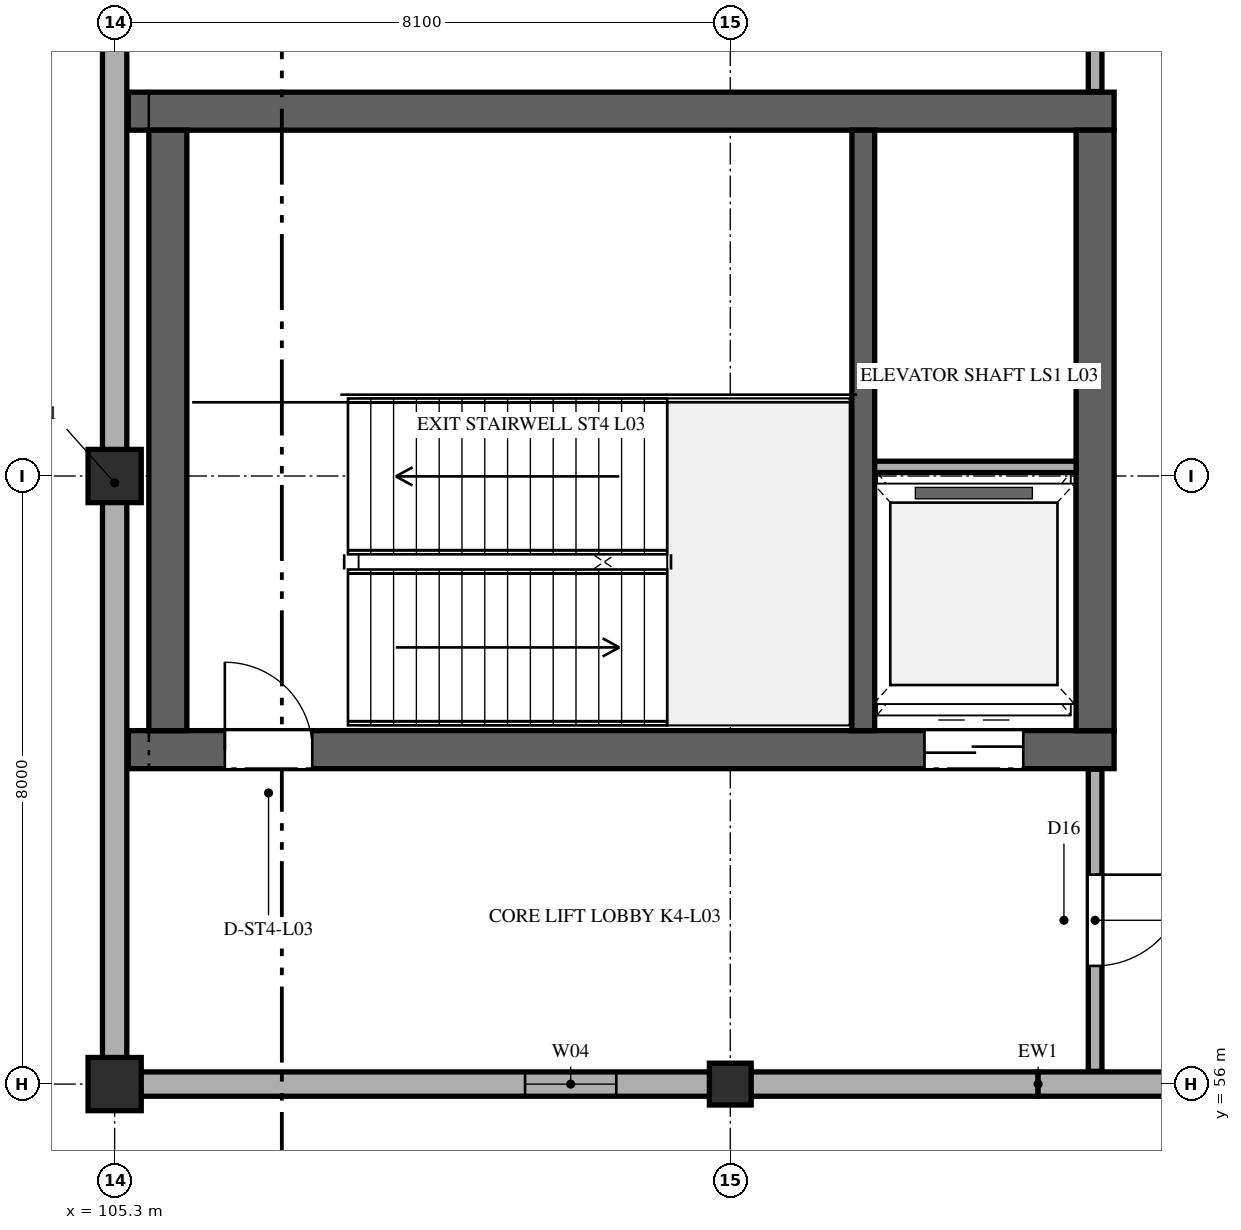
"""IFC4 building model, lengths in metres.
Left out: names, types, materials, properties, quantities, classifications, styles, units other than length and angle.
Written with IfcOpenShell. Run it as: python <this file> out.ifc"""

import sys

from ifc_helpers import new_model, si_unit, direction, frame, frame_2d, origin, origin_2d, place, context, subcontext, project, spatial, rectangle, extrude, element, fill, save


model = new_model("IFC4")
c1 = context("Model", 3, precision=1e-05, world=origin(), true_north=direction((0.0, 1.0)))
c2 = subcontext(c1, "Body", "Model", "MODEL_VIEW")
j1 = project(units=[si_unit("LENGTHUNIT", "METRE"), si_unit("PLANEANGLEUNIT", "RADIAN")], contexts=[c1])
p1 = place(None, origin())
s1 = spatial("IfcSite", under=j1, at=p1, CompositionType="ELEMENT")
p2 = place(p1, origin())
s2 = spatial("IfcBuilding", under=s1, at=p2, CompositionType="ELEMENT")
p3 = place(p2, frame((0.0, 0.0, 14.7)))
s3 = spatial("IfcBuildingStorey", under=s2, at=p3, CompositionType="ELEMENT", Elevation=14.7)
p4 = place(p3, frame((105.48, 60.4, 0.0), z_axis=(0.0, 0.0, 1.0), x_axis=(1.0, 0.0, 0.0)))
e1 = element("IfcWall", 1, at=p4, inside=s3, PredefinedType="SHEAR", context=c2, shape_type="SweptSolid", body=[
    extrude(rectangle(XDim=12.97, YDim=0.5, at=frame_2d((6.485, 0.0))), origin(), (0.0, 0.0, 1.0), 5.1),
])
p5 = place(p4, frame((1.27, 0.0, 0.0)))
e2 = element("IfcOpeningElement", 2, at=p5, cuts=e1, PredefinedType="OPENING", context=c2, shape_type="SweptSolid", body=[
    extrude(rectangle(XDim=1.15, YDim=2.25, at=frame_2d((0.575, 1.125))), frame((0.0, 0.26, 0.0), z_axis=(0.0, -1.0, 0.0), x_axis=(1.0, 0.0, 0.0)), (0.0, 0.0, 1.0), 0.52),
])
p6 = place(p4, frame((10.475, 0.0, 0.0)))
e3 = element("IfcOpeningElement", 3, at=p6, cuts=e1, PredefinedType="OPENING", context=c2, shape_type="SweptSolid", body=[
    extrude(rectangle(XDim=1.3, YDim=2.3, at=frame_2d((0.65, 1.15))), frame((0.0, 0.26, 0.0), z_axis=(0.0, -1.0, 0.0), x_axis=(1.0, 0.0, 0.0)), (0.0, 0.0, 1.0), 0.52),
])
p7 = place(p3, frame((105.48, 68.8, 0.0), z_axis=(0.0, 0.0, 1.0), x_axis=(1.0, 0.0, 0.0)))
e4 = element("IfcWall", 4, at=p7, inside=s3, PredefinedType="SHEAR", context=c2, shape_type="SweptSolid", body=[
    extrude(rectangle(XDim=12.97, YDim=0.5, at=frame_2d((6.485, 0.0))), origin(), (0.0, 0.0, 1.0), 5.1),
])
for number, where, z_axis, x_axis in (
    (5, (106.0, 60.65, 0.0), (0.0, 0.0, 1.0), (0.0, 1.0, 0.0)),
    (6, (118.2, 60.65, 0.0), (0.0, 0.0, 1.0), (0.0, 1.0, 0.0)),
):
    element("IfcWall", number, at=place(p3, frame(where, z_axis=z_axis, x_axis=x_axis)), inside=s3, PredefinedType="SHEAR", context=c2, shape_type="SweptSolid", body=[
        extrude(rectangle(XDim=7.9, YDim=0.5, at=frame_2d((3.95, 0.0))), origin(), (0.0, 0.0, 1.0), 5.1),
    ])
p8 = place(p3, frame((115.15, 60.65, 0.0), z_axis=(0.0, 0.0, 1.0), x_axis=(0.0, 1.0, 0.0)))
e7 = element("IfcWall", 7, at=p8, inside=s3, PredefinedType="SHEAR", context=c2, shape_type="SweptSolid", body=[
    extrude(rectangle(XDim=7.9, YDim=0.3, at=frame_2d((3.95, 0.0))), origin(), (0.0, 0.0, 1.0), 5.1),
])
for number, where, z_axis, x_axis in (
    (8, (105.3, 56.0, 0.0), (0.0, 0.0, 1.0), (1.0, 0.0, 0.0)),
    (9, (105.3, 64.0, 0.0), (0.0, 0.0, 1.0), (1.0, 0.0, 0.0)),
):
    element("IfcColumn", number, at=place(p3, frame(where, z_axis=z_axis, x_axis=x_axis)), inside=s3, PredefinedType="COLUMN", context=c2, shape_type="SweptSolid", body=[
        extrude(rectangle(XDim=0.7, YDim=0.7, at=origin_2d()), origin(), (0.0, 0.0, 1.0), 5.1),
    ])
p9 = place(p3, frame((113.4, 56.0, 0.0), z_axis=(0.0, 0.0, 1.0), x_axis=(1.0, 0.0, 0.0)))
e10 = element("IfcColumn", 10, at=p9, inside=s3, PredefinedType="COLUMN", context=c2, shape_type="SweptSolid", body=[
    extrude(rectangle(XDim=0.55, YDim=0.55, at=origin_2d()), origin(), (0.0, 0.0, 1.0), 5.1),
])
p10 = place(p3, frame((105.3, 71.82, 0.0), z_axis=(0.0, 0.0, 1.0), x_axis=(0.0, -1.0, 0.0)))
e11 = element("IfcWall", 11, at=p10, inside=s3, PredefinedType="SOLIDWALL", context=c2, shape_type="SweptSolid", body=[
    extrude(rectangle(XDim=15.82, YDim=0.32, at=frame_2d((7.91, 0.0))), origin(), (0.0, 0.0, 1.0), 4.332),
])
p11 = place(p3, frame((105.3, 56.0, 0.0), z_axis=(0.0, 0.0, 1.0), x_axis=(1.0, 0.0, 0.0)))
e12 = element("IfcWall", 12, at=p11, inside=s3, PredefinedType="SOLIDWALL", context=c2, shape_type="SweptSolid", body=[
    extrude(rectangle(XDim=12.15, YDim=0.32, at=frame_2d((6.075, 0.0))), origin(), (0.0, 0.0, 1.0), 4.144),
])
p12 = place(p11, frame((5.4, 0.0, 0.95)))
e13 = element("IfcOpeningElement", 13, at=p12, cuts=e12, PredefinedType="OPENING", context=c2, shape_type="SweptSolid", body=[
    extrude(rectangle(XDim=1.2, YDim=1.8, at=frame_2d((0.6, 0.9))), frame((0.0, 0.17, 0.0), z_axis=(0.0, -1.0, 0.0), x_axis=(1.0, 0.0, 0.0)), (0.0, 0.0, 1.0), 0.34),
])
p13 = place(p3, frame((117.45, 56.0, 0.0), z_axis=(0.0, 0.0, 1.0), x_axis=(1.0, 0.0, 0.0)))
e14 = element("IfcWall", 14, at=p13, inside=s3, PredefinedType="SOLIDWALL", context=c2, shape_type="SweptSolid", body=[
    extrude(rectangle(XDim=12.15, YDim=0.32, at=frame_2d((6.075, 0.0))), origin(), (0.0, 0.0, 1.0), 4.144),
])
p14 = place(p13, frame((3.6, 0.0, 0.95)))
e15 = element("IfcOpeningElement", 15, at=p14, cuts=e14, PredefinedType="OPENING", context=c2, shape_type="SweptSolid", body=[
    extrude(rectangle(XDim=1.35, YDim=1.8, at=frame_2d((0.675, 0.9))), frame((0.0, 0.17, 0.0), z_axis=(0.0, -1.0, 0.0), x_axis=(1.0, 0.0, 0.0)), (0.0, 0.0, 1.0), 0.34),
])
p15 = place(p3, frame((115.3, 64.12, 0.0), z_axis=(0.0, 0.0, 1.0), x_axis=(1.0, 0.0, 0.0)))
e16 = element("IfcWall", 16, at=p15, inside=s3, PredefinedType="PARTITIONING", context=c2, shape_type="SweptSolid", body=[
    extrude(rectangle(XDim=2.65, YDim=0.15, at=frame_2d((1.325, 0.0))), origin(), (0.0, 0.0, 1.0), 4.84),
])
p16 = place(p3, frame((118.2, 56.168, 0.0), z_axis=(0.0, 0.0, 1.0), x_axis=(0.0, 1.0, 0.0)))
e17 = element("IfcWall", 17, at=p16, inside=s3, PredefinedType="PARTITIONING", context=c2, shape_type="SweptSolid", body=[
    extrude(rectangle(XDim=3.974, YDim=0.18, at=frame_2d((1.987, 0.0))), origin(), (0.0, 0.0, 1.0), 4.84),
])
p17 = place(p16, frame((1.387, 0.0, 0.0)))
e18 = element("IfcOpeningElement", 18, at=p17, cuts=e17, PredefinedType="OPENING", context=c2, shape_type="SweptSolid", body=[
    extrude(rectangle(XDim=1.2, YDim=2.2, at=frame_2d((0.6, 1.1))), frame((0.0, 0.1, 0.0), z_axis=(0.0, -1.0, 0.0), x_axis=(1.0, 0.0, 0.0)), (0.0, 0.0, 1.0), 0.2),
])
p18 = place(p3, frame((118.2, 69.058, 0.0), z_axis=(0.0, 0.0, 1.0), x_axis=(0.0, 1.0, 0.0)))
e19 = element("IfcWall", 19, at=p18, inside=s3, PredefinedType="PARTITIONING", context=c2, shape_type="SweptSolid", body=[
    extrude(rectangle(XDim=2.844, YDim=0.18, at=frame_2d((1.422, 0.0))), origin(), (0.0, 0.0, 1.0), 4.84),
])
p19 = place(p18, frame((0.922, 0.0, 0.0)))
e20 = element("IfcOpeningElement", 20, at=p19, cuts=e19, PredefinedType="OPENING", context=c2, shape_type="SweptSolid", body=[
    extrude(rectangle(XDim=1.0, YDim=2.15, at=frame_2d((0.5, 1.075))), frame((0.0, 0.1, 0.0), z_axis=(0.0, -1.0, 0.0), x_axis=(1.0, 0.0, 0.0)), (0.0, 0.0, 1.0), 0.2),
])
p20 = place(p12, origin())
e21 = element("IfcWindow", 21, at=p20, inside=s3, PartitioningType="SINGLE_PANEL", PredefinedType="WINDOW", context=c2, shape_type="SweptSolid", body=[
    extrude(rectangle(XDim=1.2, YDim=1.8, at=frame_2d((0.6, 0.9))), frame((0.0, 0.03, 0.0), z_axis=(0.0, -1.0, 0.0), x_axis=(1.0, 0.0, 0.0)), (0.0, 0.0, 1.0), 0.06),
])
fill(e13, e21)
p21 = place(p5, origin())
e22 = element("IfcDoor", 22, at=p21, inside=s3, OperationType="SINGLE_SWING_LEFT", PredefinedType="DOOR", context=c2, shape_type="SweptSolid", body=[
    extrude(rectangle(XDim=1.15, YDim=2.25, at=frame_2d((0.575, 1.125))), frame((0.0, 0.025, 0.0), z_axis=(0.0, -1.0, 0.0), x_axis=(1.0, 0.0, 0.0)), (0.0, 0.0, 1.0), 0.05),
])
fill(e2, e22)
p22 = place(p6, frame((1.3, 0.0, 0.0), z_axis=(0.0, 0.0, 1.0), x_axis=(-1.0, 0.0, 0.0)))
e23 = element("IfcDoor", 23, at=p22, inside=s3, OperationType="DOUBLE_DOOR_SLIDING", PredefinedType="DOOR", context=c2, shape_type="SweptSolid", body=[
    extrude(rectangle(XDim=1.3, YDim=2.3, at=frame_2d((0.65, 1.15))), frame((0.0, 0.025, 0.0), z_axis=(0.0, -1.0, 0.0), x_axis=(1.0, 0.0, 0.0)), (0.0, 0.0, 1.0), 0.05),
])
fill(e3, e23)
p23 = place(p17, frame((1.2, 0.0, 0.0), z_axis=(0.0, 0.0, 1.0), x_axis=(-1.0, 0.0, 0.0)))
e24 = element("IfcDoor", 24, at=p23, inside=s3, OperationType="SINGLE_SWING_RIGHT", PredefinedType="DOOR", context=c2, shape_type="SweptSolid", body=[
    extrude(rectangle(XDim=1.2, YDim=2.2, at=frame_2d((0.6, 1.1))), frame((0.0, 0.025, 0.0), z_axis=(0.0, -1.0, 0.0), x_axis=(1.0, 0.0, 0.0)), (0.0, 0.0, 1.0), 0.05),
])
fill(e18, e24)
save(model, sys.argv[1])
